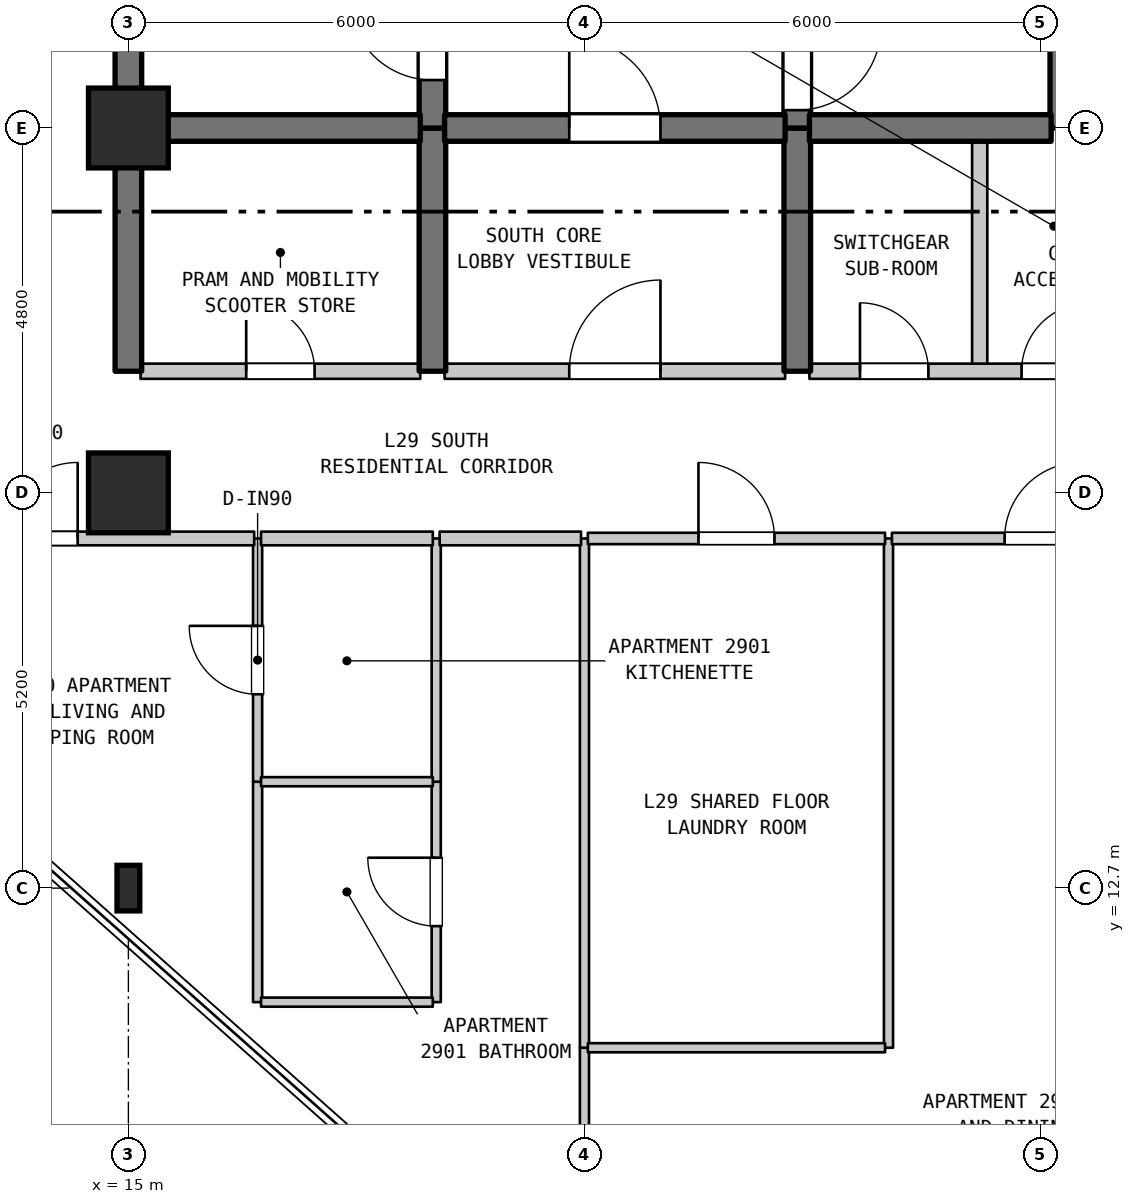
"""IFC4 building model, lengths in metres.
Left out: names, types, materials, properties, quantities, classifications, styles, units other than length and angle.
Written with IfcOpenShell. Run it as: python <this file> out.ifc"""

import sys

from ifc_helpers import new_model, si_unit, direction, frame, frame_2d, origin, origin_2d, place, context, subcontext, project, spatial, rectangle, i_section, extrude, element, fill, save


model = new_model("IFC4")
c1 = context("Model", 3, precision=1e-05, world=origin(), true_north=direction((0.0, 1.0)))
c2 = subcontext(c1, "Body", "Model", "MODEL_VIEW")
j1 = project(units=[si_unit("LENGTHUNIT", "METRE"), si_unit("PLANEANGLEUNIT", "RADIAN")], contexts=[c1])
p1 = place(None, origin())
s1 = spatial("IfcSite", under=j1, at=p1, CompositionType="ELEMENT")
p2 = place(p1, origin())
s2 = spatial("IfcBuilding", under=s1, at=p2, CompositionType="ELEMENT")
p3 = place(p2, frame((0.0, 0.0, 120.5)))
s3 = spatial("IfcBuildingStorey", under=s2, at=p3, CompositionType="ELEMENT", Elevation=120.5)
p4 = place(p3, frame((15.0, 12.7, 0.0), z_axis=(0.0, 0.0, 1.0), x_axis=(1.0, 0.0, 0.0)))
e1 = element("IfcColumn", 1, at=p4, inside=s3, PredefinedType="COLUMN", context=c2, shape_type="SweptSolid", body=[
    extrude(i_section(OverallWidth=0.3, OverallDepth=0.6, WebThickness=0.015, FlangeThickness=0.03, FilletRadius=0.027, at=origin_2d()), origin(), (0.0, 0.0, 1.0), 4.8),
])
for number, where, z_axis, x_axis in (
    (2, (15.0, 17.9, 0.0), (0.0, 0.0, 1.0), (1.0, 0.0, 0.0)),
    (3, (15.0, 22.7, 0.0), (0.0, 0.0, 1.0), (1.0, 0.0, 0.0)),
):
    element("IfcColumn", number, at=place(p3, frame(where, z_axis=z_axis, x_axis=x_axis)), inside=s3, PredefinedType="COLUMN", context=c2, shape_type="SweptSolid", body=[
        extrude(rectangle(XDim=1.05, YDim=1.05, at=origin_2d()), origin(), (0.0, 0.0, 1.0), 4.8),
    ])
p5 = place(p3, frame((15.0, 19.5, 0.0), z_axis=(0.0, 0.0, 1.0), x_axis=(0.0, 1.0, 0.0)))
e4 = element("IfcWall", 4, at=p5, inside=s3, PredefinedType="SHEAR", context=c2, shape_type="SweptSolid", body=[
    extrude(rectangle(XDim=3.2, YDim=0.35, at=frame_2d((1.6, 0.0))), origin(), (0.0, 0.0, 1.0), 4.48),
])
p6 = place(p3, frame((15.0, 22.7, 0.0), z_axis=(0.0, 0.0, 1.0), x_axis=(0.0, 1.0, 0.0)))
e5 = element("IfcWall", 5, at=p6, inside=s3, PredefinedType="SHEAR", context=c2, shape_type="SweptSolid", body=[
    extrude(rectangle(XDim=6.8, YDim=0.35, at=frame_2d((3.4, 0.0))), origin(), (0.0, 0.0, 1.0), 4.48),
])
p7 = place(p3, frame((16.7, 11.2, 0.0), z_axis=(0.0, 0.0, 1.0), x_axis=(0.0, 1.0, 0.0)))
e6 = element("IfcWall", 6, at=p7, inside=s3, PredefinedType="PARTITIONING", context=c2, shape_type="SweptSolid", body=[
    extrude(rectangle(XDim=2.9, YDim=0.12, at=frame_2d((1.45, 0.0))), origin(), (0.0, 0.0, 1.0), 4.48),
])
p8 = place(p3, frame((16.7, 14.1, 0.0), z_axis=(0.0, 0.0, 1.0), x_axis=(0.0, 1.0, 0.0)))
e7 = element("IfcWall", 7, at=p8, inside=s3, PredefinedType="PARTITIONING", context=c2, shape_type="SweptSolid", body=[
    extrude(rectangle(XDim=3.2, YDim=0.12, at=frame_2d((1.6, 0.0))), origin(), (0.0, 0.0, 1.0), 4.48),
])
p9 = place(p8, frame((1.15, 0.0, 0.0)))
e8 = element("IfcOpeningElement", 8, at=p9, cuts=e7, PredefinedType="OPENING", context=c2, shape_type="SweptSolid", body=[
    extrude(rectangle(XDim=0.9, YDim=2.15, at=frame_2d((0.45, 1.075))), frame((0.0, 0.07, 0.0), z_axis=(0.0, -1.0, 0.0), x_axis=(1.0, 0.0, 0.0)), (0.0, 0.0, 1.0), 0.14),
])
p10 = place(p3, frame((19.0, 19.5, 0.0), z_axis=(0.0, 0.0, 1.0), x_axis=(0.0, 1.0, 0.0)))
e9 = element("IfcWall", 9, at=p10, inside=s3, PredefinedType="SHEAR", context=c2, shape_type="SweptSolid", body=[
    extrude(rectangle(XDim=3.2, YDim=0.35, at=frame_2d((1.6, 0.0))), origin(), (0.0, 0.0, 1.0), 4.48),
])
p11 = place(p3, frame((19.0, 22.7, 0.0), z_axis=(0.0, 0.0, 1.0), x_axis=(0.0, 1.0, 0.0)))
e10 = element("IfcWall", 10, at=p11, inside=s3, PredefinedType="SHEAR", context=c2, shape_type="SweptSolid", body=[
    extrude(rectangle(XDim=5.5, YDim=0.35, at=frame_2d((2.75, 0.0))), origin(), (0.0, 0.0, 1.0), 4.48),
])
p12 = place(p11, frame((0.631, 0.0, 0.0)))
e11 = element("IfcOpeningElement", 11, at=p12, cuts=e10, PredefinedType="OPENING", context=c2, shape_type="SweptSolid", body=[
    extrude(rectangle(XDim=1.1, YDim=2.15, at=frame_2d((0.55, 1.075))), frame((0.0, 0.185, 0.0), z_axis=(0.0, -1.0, 0.0), x_axis=(1.0, 0.0, 0.0)), (0.0, 0.0, 1.0), 0.37),
])
p13 = place(p3, frame((19.05, 11.2, 0.0), z_axis=(0.0, 0.0, 1.0), x_axis=(0.0, 1.0, 0.0)))
e12 = element("IfcWall", 12, at=p13, inside=s3, PredefinedType="PARTITIONING", context=c2, shape_type="SweptSolid", body=[
    extrude(rectangle(XDim=2.9, YDim=0.12, at=frame_2d((1.45, 0.0))), origin(), (0.0, 0.0, 1.0), 4.48),
])
p14 = place(p13, frame((1.0, 0.0, 0.0)))
e13 = element("IfcOpeningElement", 13, at=p14, cuts=e12, PredefinedType="OPENING", context=c2, shape_type="SweptSolid", body=[
    extrude(rectangle(XDim=0.9, YDim=2.1, at=frame_2d((0.45, 1.05))), frame((0.0, 0.07, 0.0), z_axis=(0.0, -1.0, 0.0), x_axis=(1.0, 0.0, 0.0)), (0.0, 0.0, 1.0), 0.14),
])
p15 = place(p3, frame((19.05, 14.1, 0.0), z_axis=(0.0, 0.0, 1.0), x_axis=(0.0, 1.0, 0.0)))
e14 = element("IfcWall", 14, at=p15, inside=s3, PredefinedType="PARTITIONING", context=c2, shape_type="SweptSolid", body=[
    extrude(rectangle(XDim=3.2, YDim=0.12, at=frame_2d((1.6, 0.0))), origin(), (0.0, 0.0, 1.0), 4.48),
])
p16 = place(p3, frame((21.0, 6.71, 0.0), z_axis=(0.0, 0.0, 1.0), x_axis=(0.0, 1.0, 0.0)))
e15 = element("IfcWall", 15, at=p16, inside=s3, PredefinedType="PARTITIONING", context=c2, shape_type="SweptSolid", body=[
    extrude(rectangle(XDim=3.89, YDim=0.12, at=frame_2d((1.945, 0.0))), origin(), (0.0, 0.0, 1.0), 4.48),
])
p17 = place(p3, frame((21.0, 10.6, 0.0), z_axis=(0.0, 0.0, 1.0), x_axis=(0.0, 1.0, 0.0)))
e16 = element("IfcWall", 16, at=p17, inside=s3, PredefinedType="PARTITIONING", context=c2, shape_type="SweptSolid", body=[
    extrude(rectangle(XDim=6.7, YDim=0.12, at=frame_2d((3.35, 0.0))), origin(), (0.0, 0.0, 1.0), 4.48),
])
p18 = place(p3, frame((23.8, 19.5, 0.0), z_axis=(0.0, 0.0, 1.0), x_axis=(0.0, 1.0, 0.0)))
e17 = element("IfcWall", 17, at=p18, inside=s3, PredefinedType="SHEAR", context=c2, shape_type="SweptSolid", body=[
    extrude(rectangle(XDim=3.2, YDim=0.35, at=frame_2d((1.6, 0.0))), origin(), (0.0, 0.0, 1.0), 4.48),
])
p19 = place(p3, frame((23.8, 22.7, 0.0), z_axis=(0.0, 0.0, 1.0), x_axis=(0.0, 1.0, 0.0)))
e18 = element("IfcWall", 18, at=p19, inside=s3, PredefinedType="SHEAR", context=c2, shape_type="SweptSolid", body=[
    extrude(rectangle(XDim=5.5, YDim=0.35, at=frame_2d((2.75, 0.0))), origin(), (0.0, 0.0, 1.0), 4.48),
])
p20 = place(p19, frame((0.235, 0.0, 0.0)))
e19 = element("IfcOpeningElement", 19, at=p20, cuts=e18, PredefinedType="OPENING", context=c2, shape_type="SweptSolid", body=[
    extrude(rectangle(XDim=1.1, YDim=2.15, at=frame_2d((0.55, 1.075))), frame((0.0, 0.185, 0.0), z_axis=(0.0, -1.0, 0.0), x_axis=(1.0, 0.0, 0.0)), (0.0, 0.0, 1.0), 0.37),
])
p21 = place(p3, frame((25.0, 10.6, 0.0), z_axis=(0.0, 0.0, 1.0), x_axis=(0.0, 1.0, 0.0)))
e20 = element("IfcWall", 20, at=p21, inside=s3, PredefinedType="PARTITIONING", context=c2, shape_type="SweptSolid", body=[
    extrude(rectangle(XDim=6.7, YDim=0.12, at=frame_2d((3.35, 0.0))), origin(), (0.0, 0.0, 1.0), 4.48),
])
p22 = place(p3, frame((26.2, 19.5, 0.0), z_axis=(0.0, 0.0, 1.0), x_axis=(0.0, 1.0, 0.0)))
e21 = element("IfcWall", 21, at=p22, inside=s3, PredefinedType="STANDARD", context=c2, shape_type="SweptSolid", body=[
    extrude(rectangle(XDim=3.2, YDim=0.2, at=frame_2d((1.6, 0.0))), origin(), (0.0, 0.0, 1.0), 4.48),
])
p23 = place(p3, frame((27.3, 22.7, 0.0), z_axis=(0.0, 0.0, 1.0), x_axis=(0.0, 1.0, 0.0)))
e22 = element("IfcWall", 22, at=p23, inside=s3, PredefinedType="SHEAR", context=c2, shape_type="SweptSolid", body=[
    extrude(rectangle(XDim=2.9, YDim=0.35, at=frame_2d((1.45, 0.0))), origin(), (0.0, 0.0, 1.0), 4.48),
])
p24 = place(p3, frame((21.045, 10.6, 0.0), z_axis=(0.0, 0.0, 1.0), x_axis=(1.0, 0.0, 0.0)))
e23 = element("IfcWall", 23, at=p24, inside=s3, PredefinedType="PARTITIONING", context=c2, shape_type="SweptSolid", body=[
    extrude(rectangle(XDim=3.91, YDim=0.12, at=frame_2d((1.955, 0.0))), origin(), (0.0, 0.0, 1.0), 4.48),
])
for number, where, z_axis, x_axis in (
    (24, (16.745, 11.2, 0.0), (0.0, 0.0, 1.0), (1.0, 0.0, 0.0)),
    (25, (16.745, 14.1, 0.0), (0.0, 0.0, 1.0), (1.0, 0.0, 0.0)),
):
    element("IfcWall", number, at=place(p3, frame(where, z_axis=z_axis, x_axis=x_axis)), inside=s3, PredefinedType="PARTITIONING", context=c2, shape_type="SweptSolid", body=[
        extrude(rectangle(XDim=2.26, YDim=0.12, at=frame_2d((1.13, 0.0))), origin(), (0.0, 0.0, 1.0), 4.48),
    ])
p25 = place(p3, frame((12.875, 17.3, 0.0), z_axis=(0.0, 0.0, 1.0), x_axis=(1.0, 0.0, 0.0)))
e26 = element("IfcWall", 26, at=p25, inside=s3, PredefinedType="STANDARD", context=c2, shape_type="SweptSolid", body=[
    extrude(rectangle(XDim=3.78, YDim=0.18, at=frame_2d((1.89, 0.0))), origin(), (0.0, 0.0, 1.0), 4.48),
])
p26 = place(p25, frame((0.458, 0.0, 0.0)))
e27 = element("IfcOpeningElement", 27, at=p26, cuts=e26, PredefinedType="OPENING", context=c2, shape_type="SweptSolid", body=[
    extrude(rectangle(XDim=1.0, YDim=2.15, at=frame_2d((0.5, 1.075))), frame((0.0, 0.1, 0.0), z_axis=(0.0, -1.0, 0.0), x_axis=(1.0, 0.0, 0.0)), (0.0, 0.0, 1.0), 0.2),
])
p27 = place(p3, frame((16.745, 17.3, 0.0), z_axis=(0.0, 0.0, 1.0), x_axis=(1.0, 0.0, 0.0)))
e28 = element("IfcWall", 28, at=p27, inside=s3, PredefinedType="STANDARD", context=c2, shape_type="SweptSolid", body=[
    extrude(rectangle(XDim=2.26, YDim=0.18, at=frame_2d((1.13, 0.0))), origin(), (0.0, 0.0, 1.0), 4.48),
])
p28 = place(p3, frame((19.095, 17.3, 0.0), z_axis=(0.0, 0.0, 1.0), x_axis=(1.0, 0.0, 0.0)))
e29 = element("IfcWall", 29, at=p28, inside=s3, PredefinedType="STANDARD", context=c2, shape_type="SweptSolid", body=[
    extrude(rectangle(XDim=1.86, YDim=0.18, at=frame_2d((0.93, 0.0))), origin(), (0.0, 0.0, 1.0), 4.48),
])
p29 = place(p3, frame((21.045, 17.3, 0.0), z_axis=(0.0, 0.0, 1.0), x_axis=(1.0, 0.0, 0.0)))
e30 = element("IfcWall", 30, at=p29, inside=s3, PredefinedType="STANDARD", context=c2, shape_type="SweptSolid", body=[
    extrude(rectangle(XDim=3.91, YDim=0.15, at=frame_2d((1.955, 0.0))), origin(), (0.0, 0.0, 1.0), 4.48),
])
p30 = place(p29, frame((1.455, 0.0, 0.0)))
e31 = element("IfcOpeningElement", 31, at=p30, cuts=e30, PredefinedType="OPENING", context=c2, shape_type="SweptSolid", body=[
    extrude(rectangle(XDim=1.0, YDim=2.15, at=frame_2d((0.5, 1.075))), frame((0.0, 0.085, 0.0), z_axis=(0.0, -1.0, 0.0), x_axis=(1.0, 0.0, 0.0)), (0.0, 0.0, 1.0), 0.17),
])
p31 = place(p3, frame((25.045, 17.3, 0.0), z_axis=(0.0, 0.0, 1.0), x_axis=(1.0, 0.0, 0.0)))
e32 = element("IfcWall", 32, at=p31, inside=s3, PredefinedType="STANDARD", context=c2, shape_type="SweptSolid", body=[
    extrude(rectangle(XDim=4.11, YDim=0.15, at=frame_2d((2.055, 0.0))), origin(), (0.0, 0.0, 1.0), 4.48),
])
p32 = place(p31, frame((1.483, 0.0, 0.0)))
e33 = element("IfcOpeningElement", 33, at=p32, cuts=e32, PredefinedType="OPENING", context=c2, shape_type="SweptSolid", body=[
    extrude(rectangle(XDim=1.0, YDim=2.15, at=frame_2d((0.5, 1.075))), frame((0.0, 0.085, 0.0), z_axis=(0.0, -1.0, 0.0), x_axis=(1.0, 0.0, 0.0)), (0.0, 0.0, 1.0), 0.17),
])
p33 = place(p3, frame((15.16, 19.5, 0.0), z_axis=(0.0, 0.0, 1.0), x_axis=(1.0, 0.0, 0.0)))
e34 = element("IfcWall", 34, at=p33, inside=s3, PredefinedType="STANDARD", context=c2, shape_type="SweptSolid", body=[
    extrude(rectangle(XDim=3.68, YDim=0.2, at=frame_2d((1.84, 0.0))), origin(), (0.0, 0.0, 1.0), 4.48),
])
p34 = place(p33, frame((1.39, 0.0, 0.0)))
e35 = element("IfcOpeningElement", 35, at=p34, cuts=e34, PredefinedType="OPENING", context=c2, shape_type="SweptSolid", body=[
    extrude(rectangle(XDim=0.9, YDim=2.15, at=frame_2d((0.45, 1.075))), frame((0.0, 0.11, 0.0), z_axis=(0.0, -1.0, 0.0), x_axis=(1.0, 0.0, 0.0)), (0.0, 0.0, 1.0), 0.22),
])
p35 = place(p3, frame((19.16, 19.5, 0.0), z_axis=(0.0, 0.0, 1.0), x_axis=(1.0, 0.0, 0.0)))
e36 = element("IfcWall", 36, at=p35, inside=s3, PredefinedType="STANDARD", context=c2, shape_type="SweptSolid", body=[
    extrude(rectangle(XDim=4.48, YDim=0.2, at=frame_2d((2.24, 0.0))), origin(), (0.0, 0.0, 1.0), 4.48),
])
p36 = place(p35, frame((1.64, 0.0, 0.0)))
e37 = element("IfcOpeningElement", 37, at=p36, cuts=e36, PredefinedType="OPENING", context=c2, shape_type="SweptSolid", body=[
    extrude(rectangle(XDim=1.2, YDim=2.2, at=frame_2d((0.6, 1.1))), frame((0.0, 0.11, 0.0), z_axis=(0.0, -1.0, 0.0), x_axis=(1.0, 0.0, 0.0)), (0.0, 0.0, 1.0), 0.22),
])
p37 = place(p3, frame((23.96, 19.5, 0.0), z_axis=(0.0, 0.0, 1.0), x_axis=(1.0, 0.0, 0.0)))
e38 = element("IfcWall", 38, at=p37, inside=s3, PredefinedType="STANDARD", context=c2, shape_type="SweptSolid", body=[
    extrude(rectangle(XDim=4.455, YDim=0.2, at=frame_2d((2.228, 0.0))), origin(), (0.0, 0.0, 1.0), 4.48),
])
p38 = place(p37, frame((0.665, 0.0, 0.0)))
e39 = element("IfcOpeningElement", 39, at=p38, cuts=e38, PredefinedType="OPENING", context=c2, shape_type="SweptSolid", body=[
    extrude(rectangle(XDim=0.9, YDim=2.15, at=frame_2d((0.45, 1.075))), frame((0.0, 0.11, 0.0), z_axis=(0.0, -1.0, 0.0), x_axis=(1.0, 0.0, 0.0)), (0.0, 0.0, 1.0), 0.22),
])
p39 = place(p37, frame((2.791, 0.0, 0.0)))
e40 = element("IfcOpeningElement", 40, at=p39, cuts=e38, PredefinedType="OPENING", context=c2, shape_type="SweptSolid", body=[
    extrude(rectangle(XDim=0.9, YDim=2.15, at=frame_2d((0.45, 1.075))), frame((0.0, 0.11, 0.0), z_axis=(0.0, -1.0, 0.0), x_axis=(1.0, 0.0, 0.0)), (0.0, 0.0, 1.0), 0.22),
])
p40 = place(p3, frame((15.16, 22.7, 0.0), z_axis=(0.0, 0.0, 1.0), x_axis=(1.0, 0.0, 0.0)))
e41 = element("IfcWall", 41, at=p40, inside=s3, PredefinedType="SHEAR", context=c2, shape_type="SweptSolid", body=[
    extrude(rectangle(XDim=3.68, YDim=0.35, at=frame_2d((1.84, 0.0))), origin(), (0.0, 0.0, 1.0), 4.48),
])
p41 = place(p3, frame((19.16, 22.7, 0.0), z_axis=(0.0, 0.0, 1.0), x_axis=(1.0, 0.0, 0.0)))
e42 = element("IfcWall", 42, at=p41, inside=s3, PredefinedType="SHEAR", context=c2, shape_type="SweptSolid", body=[
    extrude(rectangle(XDim=4.48, YDim=0.35, at=frame_2d((2.24, 0.0))), origin(), (0.0, 0.0, 1.0), 4.48),
])
p42 = place(p41, frame((1.64, 0.0, 0.0)))
e43 = element("IfcOpeningElement", 43, at=p42, cuts=e42, PredefinedType="OPENING", context=c2, shape_type="SweptSolid", body=[
    extrude(rectangle(XDim=1.2, YDim=2.2, at=frame_2d((0.6, 1.1))), frame((0.0, 0.185, 0.0), z_axis=(0.0, -1.0, 0.0), x_axis=(1.0, 0.0, 0.0)), (0.0, 0.0, 1.0), 0.37),
])
p43 = place(p3, frame((23.96, 22.7, 0.0), z_axis=(0.0, 0.0, 1.0), x_axis=(1.0, 0.0, 0.0)))
e44 = element("IfcWall", 44, at=p43, inside=s3, PredefinedType="SHEAR", context=c2, shape_type="SweptSolid", body=[
    extrude(rectangle(XDim=3.18, YDim=0.35, at=frame_2d((1.59, 0.0))), origin(), (0.0, 0.0, 1.0), 4.48),
])
p44 = place(p9, origin())
e45 = element("IfcDoor", 45, at=p44, inside=s3, OperationType="SINGLE_SWING_RIGHT", PredefinedType="DOOR", context=c2, shape_type="SweptSolid", body=[
    extrude(rectangle(XDim=0.9, YDim=2.15, at=frame_2d((0.45, 1.075))), frame((0.0, 0.025, 0.0), z_axis=(0.0, -1.0, 0.0), x_axis=(1.0, 0.0, 0.0)), (0.0, 0.0, 1.0), 0.05),
])
fill(e8, e45)
p45 = place(p12, origin())
e46 = element("IfcDoor", 46, at=p45, inside=s3, OperationType="SINGLE_SWING_RIGHT", PredefinedType="DOOR", context=c2, shape_type="SweptSolid", body=[
    extrude(rectangle(XDim=1.1, YDim=2.15, at=frame_2d((0.55, 1.075))), frame((0.0, 0.025, 0.0), z_axis=(0.0, -1.0, 0.0), x_axis=(1.0, 0.0, 0.0)), (0.0, 0.0, 1.0), 0.05),
])
fill(e11, e46)
p46 = place(p14, origin())
e47 = element("IfcDoor", 47, at=p46, inside=s3, OperationType="SINGLE_SWING_RIGHT", PredefinedType="DOOR", context=c2, shape_type="SweptSolid", body=[
    extrude(rectangle(XDim=0.9, YDim=2.1, at=frame_2d((0.45, 1.05))), frame((0.0, 0.025, 0.0), z_axis=(0.0, -1.0, 0.0), x_axis=(1.0, 0.0, 0.0)), (0.0, 0.0, 1.0), 0.05),
])
fill(e13, e47)
p47 = place(p20, frame((1.1, 0.0, 0.0), z_axis=(0.0, 0.0, 1.0), x_axis=(-1.0, 0.0, 0.0)))
e48 = element("IfcDoor", 48, at=p47, inside=s3, OperationType="SINGLE_SWING_RIGHT", PredefinedType="DOOR", context=c2, shape_type="SweptSolid", body=[
    extrude(rectangle(XDim=1.1, YDim=2.15, at=frame_2d((0.55, 1.075))), frame((0.0, 0.025, 0.0), z_axis=(0.0, -1.0, 0.0), x_axis=(1.0, 0.0, 0.0)), (0.0, 0.0, 1.0), 0.05),
])
fill(e19, e48)
p48 = place(p26, origin())
e49 = element("IfcDoor", 49, at=p48, inside=s3, OperationType="SINGLE_SWING_RIGHT", PredefinedType="DOOR", context=c2, shape_type="SweptSolid", body=[
    extrude(rectangle(XDim=1.0, YDim=2.15, at=frame_2d((0.5, 1.075))), frame((0.0, 0.025, 0.0), z_axis=(0.0, -1.0, 0.0), x_axis=(1.0, 0.0, 0.0)), (0.0, 0.0, 1.0), 0.05),
])
fill(e27, e49)
p49 = place(p30, origin())
e50 = element("IfcDoor", 50, at=p49, inside=s3, OperationType="SINGLE_SWING_LEFT", PredefinedType="DOOR", context=c2, shape_type="SweptSolid", body=[
    extrude(rectangle(XDim=1.0, YDim=2.15, at=frame_2d((0.5, 1.075))), frame((0.0, 0.025, 0.0), z_axis=(0.0, -1.0, 0.0), x_axis=(1.0, 0.0, 0.0)), (0.0, 0.0, 1.0), 0.05),
])
fill(e31, e50)
p50 = place(p32, origin())
e51 = element("IfcDoor", 51, at=p50, inside=s3, OperationType="SINGLE_SWING_RIGHT", PredefinedType="DOOR", context=c2, shape_type="SweptSolid", body=[
    extrude(rectangle(XDim=1.0, YDim=2.15, at=frame_2d((0.5, 1.075))), frame((0.0, 0.025, 0.0), z_axis=(0.0, -1.0, 0.0), x_axis=(1.0, 0.0, 0.0)), (0.0, 0.0, 1.0), 0.05),
])
fill(e33, e51)
p51 = place(p34, origin())
e52 = element("IfcDoor", 52, at=p51, inside=s3, OperationType="SINGLE_SWING_LEFT", PredefinedType="DOOR", context=c2, shape_type="SweptSolid", body=[
    extrude(rectangle(XDim=0.9, YDim=2.15, at=frame_2d((0.45, 1.075))), frame((0.0, 0.025, 0.0), z_axis=(0.0, -1.0, 0.0), x_axis=(1.0, 0.0, 0.0)), (0.0, 0.0, 1.0), 0.05),
])
fill(e35, e52)
p52 = place(p36, origin())
e53 = element("IfcDoor", 53, at=p52, inside=s3, OperationType="SINGLE_SWING_RIGHT", PredefinedType="DOOR", context=c2, shape_type="SweptSolid", body=[
    extrude(rectangle(XDim=1.2, YDim=2.2, at=frame_2d((0.6, 1.1))), frame((0.0, 0.025, 0.0), z_axis=(0.0, -1.0, 0.0), x_axis=(1.0, 0.0, 0.0)), (0.0, 0.0, 1.0), 0.05),
])
fill(e37, e53)
p53 = place(p38, origin())
e54 = element("IfcDoor", 54, at=p53, inside=s3, OperationType="SINGLE_SWING_LEFT", PredefinedType="DOOR", context=c2, shape_type="SweptSolid", body=[
    extrude(rectangle(XDim=0.9, YDim=2.15, at=frame_2d((0.45, 1.075))), frame((0.0, 0.025, 0.0), z_axis=(0.0, -1.0, 0.0), x_axis=(1.0, 0.0, 0.0)), (0.0, 0.0, 1.0), 0.05),
])
fill(e39, e54)
p54 = place(p39, origin())
e55 = element("IfcDoor", 55, at=p54, inside=s3, OperationType="SINGLE_SWING_RIGHT", PredefinedType="DOOR", context=c2, shape_type="SweptSolid", body=[
    extrude(rectangle(XDim=0.9, YDim=2.15, at=frame_2d((0.45, 1.075))), frame((0.0, 0.025, 0.0), z_axis=(0.0, -1.0, 0.0), x_axis=(1.0, 0.0, 0.0)), (0.0, 0.0, 1.0), 0.05),
])
fill(e40, e55)
p55 = place(p42, origin())
e56 = element("IfcDoor", 56, at=p55, inside=s3, OperationType="SINGLE_SWING_LEFT", PredefinedType="DOOR", context=c2, shape_type="SweptSolid", body=[
    extrude(rectangle(XDim=1.2, YDim=2.2, at=frame_2d((0.6, 1.1))), frame((0.0, 0.025, 0.0), z_axis=(0.0, -1.0, 0.0), x_axis=(1.0, 0.0, 0.0)), (0.0, 0.0, 1.0), 0.05),
])
fill(e43, e56)
save(model, sys.argv[1])
